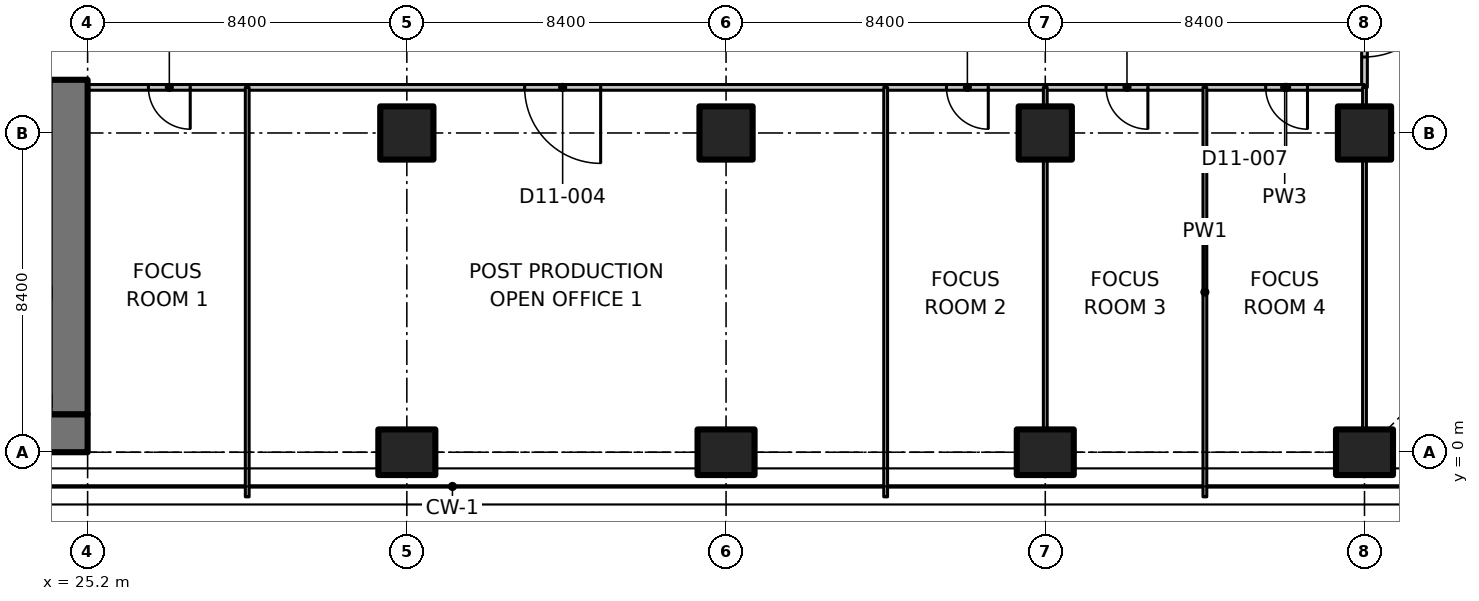
"""IFC4 building model, lengths in metres.
Left out: names, types, materials, properties, quantities, classifications, styles, units other than length and angle.
Written with IfcOpenShell. Run it as: python <this file> out.ifc"""

import sys

from ifc_helpers import new_model, si_unit, direction, frame, frame_2d, origin, origin_2d, place, context, subcontext, project, spatial, polyline, rectangle, outline, extrude, element, fill, save


model = new_model("IFC4")
c1 = context("Model", 3, precision=1e-05, world=origin(), true_north=direction((0.0, 1.0)))
c2 = subcontext(c1, "Body", "Model", "MODEL_VIEW")
j1 = project(units=[si_unit("LENGTHUNIT", "METRE"), si_unit("PLANEANGLEUNIT", "RADIAN")], contexts=[c1])
p1 = place(None, origin())
s1 = spatial("IfcSite", under=j1, at=p1, CompositionType="ELEMENT")
p2 = place(p1, origin())
s2 = spatial("IfcBuilding", under=s1, at=p2, CompositionType="ELEMENT")
p3 = place(p2, frame((0.0, 0.0, 83.3)))
s3 = spatial("IfcBuildingStorey", under=s2, at=p3, CompositionType="ELEMENT", Elevation=83.3)
p4 = place(p3, frame((33.6, 0.0, 0.0), z_axis=(0.0, 0.0, 1.0), x_axis=(0.0, 1.0, 0.0)))
e1 = element("IfcColumn", 1, at=p4, inside=s3, PredefinedType="COLUMN", context=c2, shape_type="SweptSolid", body=[
    extrude(rectangle(XDim=1.2, YDim=1.5, at=origin_2d()), origin(), (0.0, 0.0, 1.0), 3.3),
])
p5 = place(p3, frame((33.6, 8.4, 0.0), z_axis=(0.0, 0.0, 1.0), x_axis=(1.0, 0.0, 0.0)))
e2 = element("IfcColumn", 2, at=p5, inside=s3, PredefinedType="COLUMN", context=c2, shape_type="SweptSolid", body=[
    extrude(rectangle(XDim=1.4, YDim=1.4, at=origin_2d()), origin(), (0.0, 0.0, 1.0), 3.3),
])
p6 = place(p3, frame((42.0, 0.0, 0.0), z_axis=(0.0, 0.0, 1.0), x_axis=(0.0, 1.0, 0.0)))
e3 = element("IfcColumn", 3, at=p6, inside=s3, PredefinedType="COLUMN", context=c2, shape_type="SweptSolid", body=[
    extrude(rectangle(XDim=1.2, YDim=1.5, at=origin_2d()), origin(), (0.0, 0.0, 1.0), 3.3),
])
p7 = place(p3, frame((42.0, 8.4, 0.0), z_axis=(0.0, 0.0, 1.0), x_axis=(1.0, 0.0, 0.0)))
e4 = element("IfcColumn", 4, at=p7, inside=s3, PredefinedType="COLUMN", context=c2, shape_type="SweptSolid", body=[
    extrude(rectangle(XDim=1.4, YDim=1.4, at=origin_2d()), origin(), (0.0, 0.0, 1.0), 3.3),
])
p8 = place(p3, frame((50.4, 0.0, 0.0), z_axis=(0.0, 0.0, 1.0), x_axis=(0.0, 1.0, 0.0)))
e5 = element("IfcColumn", 5, at=p8, inside=s3, PredefinedType="COLUMN", context=c2, shape_type="SweptSolid", body=[
    extrude(rectangle(XDim=1.2, YDim=1.5, at=origin_2d()), origin(), (0.0, 0.0, 1.0), 3.3),
])
p9 = place(p3, frame((50.4, 8.4, 0.0), z_axis=(0.0, 0.0, 1.0), x_axis=(1.0, 0.0, 0.0)))
e6 = element("IfcColumn", 6, at=p9, inside=s3, PredefinedType="COLUMN", context=c2, shape_type="SweptSolid", body=[
    extrude(rectangle(XDim=1.4, YDim=1.4, at=origin_2d()), origin(), (0.0, 0.0, 1.0), 3.3),
])
p10 = place(p3, frame((58.8, 0.0, 0.0), z_axis=(0.0, 0.0, 1.0), x_axis=(0.0, 1.0, 0.0)))
e7 = element("IfcColumn", 7, at=p10, inside=s3, PredefinedType="COLUMN", context=c2, shape_type="SweptSolid", body=[
    extrude(rectangle(XDim=1.2, YDim=1.5, at=origin_2d()), origin(), (0.0, 0.0, 1.0), 3.3),
])
p11 = place(p3, frame((58.8, 8.4, 0.0), z_axis=(0.0, 0.0, 1.0), x_axis=(1.0, 0.0, 0.0)))
e8 = element("IfcColumn", 8, at=p11, inside=s3, PredefinedType="COLUMN", context=c2, shape_type="SweptSolid", body=[
    extrude(rectangle(XDim=1.4, YDim=1.4, at=origin_2d()), origin(), (0.0, 0.0, 1.0), 3.3),
])
p12 = place(p3, frame((6.936, 0.5, 0.0), z_axis=(0.0, 0.0, 1.0), x_axis=(1.0, 0.0, 0.0)))
e9 = element("IfcWall", 9, at=p12, inside=s3, PredefinedType="SHEAR", context=c2, shape_type="SweptSolid", body=[
    extrude(rectangle(XDim=18.264, YDim=1.0, at=frame_2d((9.132, 0.0))), origin(), (0.0, 0.0, 1.0), 3.3),
])
p13 = place(p3, frame((24.7, 1.0, 0.0), z_axis=(0.0, 0.0, 1.0), x_axis=(0.0, 1.0, 0.0)))
e10 = element("IfcWall", 10, at=p13, inside=s3, PredefinedType="SHEAR", context=c2, shape_type="SweptSolid", body=[
    extrude(rectangle(XDim=8.8, YDim=1.0, at=frame_2d((4.4, 0.0))), origin(), (0.0, 0.0, 1.0), 3.3),
])
p14 = place(p3, frame((29.4, 9.6, 0.0), z_axis=(0.0, 0.0, 1.0), x_axis=(-1.0, 0.0, 0.0)))
e11 = element("IfcWall", 11, at=p14, inside=s3, PredefinedType="PARTITIONING", context=c2, shape_type="SweptSolid", body=[
    extrude(rectangle(XDim=4.2, YDim=0.15, at=frame_2d((2.1, 0.0))), origin(), (0.0, 0.0, 1.0), 3.28),
])
p15 = place(p14, frame((1.5, 0.0, 0.0)))
e12 = element("IfcOpeningElement", 12, at=p15, cuts=e11, PredefinedType="OPENING", context=c2, shape_type="SweptSolid", body=[
    extrude(rectangle(XDim=1.1, YDim=2.1, at=frame_2d((0.55, 1.05))), frame((0.0, 0.085, 0.0), z_axis=(0.0, -1.0, 0.0), x_axis=(1.0, 0.0, 0.0)), (0.0, 0.0, 1.0), 0.17),
])
p16 = place(p3, frame((58.8, 13.0, 0.0), z_axis=(0.0, 0.0, 1.0), x_axis=(0.0, -1.0, 0.0)))
e13 = element("IfcWall", 13, at=p16, inside=s3, PredefinedType="PARTITIONING", context=c2, shape_type="SweptSolid", body=[
    extrude(rectangle(XDim=3.4, YDim=0.15, at=frame_2d((1.7, 0.0))), origin(), (0.0, 0.0, 1.0), 3.28),
])
p17 = place(p16, frame((0.6, 0.0, 0.0)))
e14 = element("IfcOpeningElement", 14, at=p17, cuts=e13, PredefinedType="OPENING", context=c2, shape_type="SweptSolid", body=[
    extrude(rectangle(XDim=2.0, YDim=2.4, at=frame_2d((1.0, 1.2))), frame((0.0, 0.085, 0.0), z_axis=(0.0, -1.0, 0.0), x_axis=(1.0, 0.0, 0.0)), (0.0, 0.0, 1.0), 0.17),
])
p18 = place(p3, frame((46.2, 9.6, 0.0), z_axis=(0.0, 0.0, 1.0), x_axis=(-1.0, 0.0, 0.0)))
e15 = element("IfcWall", 15, at=p18, inside=s3, PredefinedType="PARTITIONING", context=c2, shape_type="SweptSolid", body=[
    extrude(rectangle(XDim=16.8, YDim=0.15, at=frame_2d((8.4, 0.0))), origin(), (0.0, 0.0, 1.0), 3.28),
])
p19 = place(p18, frame((7.5, 0.0, 0.0)))
e16 = element("IfcOpeningElement", 16, at=p19, cuts=e15, PredefinedType="OPENING", context=c2, shape_type="SweptSolid", body=[
    extrude(rectangle(XDim=2.0, YDim=2.4, at=frame_2d((1.0, 1.2))), frame((0.0, 0.085, 0.0), z_axis=(0.0, -1.0, 0.0), x_axis=(1.0, 0.0, 0.0)), (0.0, 0.0, 1.0), 0.17),
])
p20 = place(p3, frame((50.4, 9.6, 0.0), z_axis=(0.0, 0.0, 1.0), x_axis=(-1.0, 0.0, 0.0)))
e17 = element("IfcWall", 17, at=p20, inside=s3, PredefinedType="PARTITIONING", context=c2, shape_type="SweptSolid", body=[
    extrude(rectangle(XDim=4.2, YDim=0.15, at=frame_2d((2.1, 0.0))), origin(), (0.0, 0.0, 1.0), 3.28),
])
p21 = place(p20, frame((1.5, 0.0, 0.0)))
e18 = element("IfcOpeningElement", 18, at=p21, cuts=e17, PredefinedType="OPENING", context=c2, shape_type="SweptSolid", body=[
    extrude(rectangle(XDim=1.1, YDim=2.1, at=frame_2d((0.55, 1.05))), frame((0.0, 0.085, 0.0), z_axis=(0.0, -1.0, 0.0), x_axis=(1.0, 0.0, 0.0)), (0.0, 0.0, 1.0), 0.17),
])
p22 = place(p3, frame((54.6, 9.6, 0.0), z_axis=(0.0, 0.0, 1.0), x_axis=(-1.0, 0.0, 0.0)))
e19 = element("IfcWall", 19, at=p22, inside=s3, PredefinedType="PARTITIONING", context=c2, shape_type="SweptSolid", body=[
    extrude(rectangle(XDim=4.2, YDim=0.15, at=frame_2d((2.1, 0.0))), origin(), (0.0, 0.0, 1.0), 3.28),
])
p23 = place(p22, frame((1.5, 0.0, 0.0)))
e20 = element("IfcOpeningElement", 20, at=p23, cuts=e19, PredefinedType="OPENING", context=c2, shape_type="SweptSolid", body=[
    extrude(rectangle(XDim=1.1, YDim=2.1, at=frame_2d((0.55, 1.05))), frame((0.0, 0.085, 0.0), z_axis=(0.0, -1.0, 0.0), x_axis=(1.0, 0.0, 0.0)), (0.0, 0.0, 1.0), 0.17),
])
p24 = place(p3, frame((58.8, 9.6, 0.0), z_axis=(0.0, 0.0, 1.0), x_axis=(-1.0, 0.0, 0.0)))
e21 = element("IfcWall", 21, at=p24, inside=s3, PredefinedType="PARTITIONING", context=c2, shape_type="SweptSolid", body=[
    extrude(rectangle(XDim=4.2, YDim=0.15, at=frame_2d((2.1, 0.0))), origin(), (0.0, 0.0, 1.0), 3.28),
])
p25 = place(p24, frame((1.5, 0.0, 0.0)))
e22 = element("IfcOpeningElement", 22, at=p25, cuts=e21, PredefinedType="OPENING", context=c2, shape_type="SweptSolid", body=[
    extrude(rectangle(XDim=1.1, YDim=2.1, at=frame_2d((0.55, 1.05))), frame((0.0, 0.085, 0.0), z_axis=(0.0, -1.0, 0.0), x_axis=(1.0, 0.0, 0.0)), (0.0, 0.0, 1.0), 0.17),
])
p26 = place(p3, frame((58.8, 0.62, 0.0), z_axis=(0.0, 0.0, 1.0), x_axis=(0.0, 1.0, 0.0)))
e23 = element("IfcWall", 23, at=p26, inside=s3, PredefinedType="PARTITIONING", context=c2, shape_type="SweptSolid", body=[
    extrude(rectangle(XDim=7.06, YDim=0.1, at=frame_2d((3.53, 0.0))), origin(), (0.0, 0.0, 1.0), 3.28),
])
p27 = place(p3, frame((58.8, 9.12, 0.0), z_axis=(0.0, 0.0, 1.0), x_axis=(0.0, 1.0, 0.0)))
e24 = element("IfcWall", 24, at=p27, inside=s3, PredefinedType="PARTITIONING", context=c2, shape_type="SweptSolid", body=[
    extrude(rectangle(XDim=0.48, YDim=0.1, at=frame_2d((0.24, 0.0))), origin(), (0.0, 0.0, 1.0), 3.28),
])
for number, where, z_axis, x_axis in (
    (25, (29.4, 9.6, 0.0), (0.0, 0.0, 1.0), (0.0, -1.0, 0.0)),
    (26, (46.2, 9.6, 0.0), (0.0, 0.0, 1.0), (0.0, -1.0, 0.0)),
):
    element("IfcWall", number, at=place(p3, frame(where, z_axis=z_axis, x_axis=x_axis)), inside=s3, PredefinedType="PARTITIONING", context=c2, shape_type="SweptSolid", body=[
        extrude(outline(polyline([(0.0, 0.0), (10.774, 0.0), (10.774, 3.28), (10.7, 3.28), (10.05, 3.28), (10.048, 2.93), (9.152, 2.93), (9.15, 3.28), (0.0, 3.28), (0.0, 0.0)])), frame((0.0, 0.05, 0.0), z_axis=(0.0, -1.0, 0.0), x_axis=(1.0, 0.0, 0.0)), (0.0, 0.0, 1.0), 0.1),
    ])
p28 = place(p3, frame((50.4, 9.6, 0.0), z_axis=(0.0, 0.0, 1.0), x_axis=(0.0, -1.0, 0.0)))
e27 = element("IfcWall", 27, at=p28, inside=s3, PredefinedType="PARTITIONING", context=c2, shape_type="SweptSolid", body=[
    extrude(rectangle(XDim=0.48, YDim=0.1, at=frame_2d((0.24, 0.0))), origin(), (0.0, 0.0, 1.0), 3.28),
])
p29 = place(p3, frame((50.4, 7.68, 0.0), z_axis=(0.0, 0.0, 1.0), x_axis=(0.0, -1.0, 0.0)))
e28 = element("IfcWall", 28, at=p29, inside=s3, PredefinedType="PARTITIONING", context=c2, shape_type="SweptSolid", body=[
    extrude(rectangle(XDim=7.06, YDim=0.1, at=frame_2d((3.53, 0.0))), origin(), (0.0, 0.0, 1.0), 3.28),
])
p30 = place(p3, frame((54.6, 9.6, 0.0), z_axis=(0.0, 0.0, 1.0), x_axis=(0.0, -1.0, 0.0)))
e29 = element("IfcWall", 29, at=p30, inside=s3, PredefinedType="PARTITIONING", context=c2, shape_type="SweptSolid", body=[
    extrude(outline(polyline([(0.0, 0.0), (10.774, 0.0), (10.774, 3.28), (10.7, 3.28), (10.05, 3.28), (10.048, 2.93), (9.152, 2.93), (9.15, 3.28), (0.0, 3.28), (0.0, 0.0)])), frame((0.0, 0.05, 0.0), z_axis=(0.0, -1.0, 0.0), x_axis=(1.0, 0.0, 0.0)), (0.0, 0.0, 1.0), 0.1),
])
p31 = place(p17, origin())
e30 = element("IfcDoor", 30, at=p31, inside=s3, OperationType="DOUBLE_DOOR_SINGLE_SWING", PredefinedType="DOOR", context=c2, shape_type="SweptSolid", body=[
    extrude(rectangle(XDim=2.0, YDim=2.4, at=frame_2d((1.0, 1.2))), frame((0.0, 0.025, 0.0), z_axis=(0.0, -1.0, 0.0), x_axis=(1.0, 0.0, 0.0)), (0.0, 0.0, 1.0), 0.05),
])
fill(e14, e30)
p32 = place(p15, origin())
e31 = element("IfcDoor", 31, at=p32, inside=s3, OperationType="SINGLE_SWING_LEFT", PredefinedType="DOOR", context=c2, shape_type="SweptSolid", body=[
    extrude(rectangle(XDim=1.1, YDim=2.1, at=frame_2d((0.55, 1.05))), frame((0.0, 0.025, 0.0), z_axis=(0.0, -1.0, 0.0), x_axis=(1.0, 0.0, 0.0)), (0.0, 0.0, 1.0), 0.05),
])
fill(e12, e31)
p33 = place(p19, origin())
e32 = element("IfcDoor", 32, at=p33, inside=s3, OperationType="DOUBLE_DOOR_SINGLE_SWING", PredefinedType="DOOR", context=c2, shape_type="SweptSolid", body=[
    extrude(rectangle(XDim=2.0, YDim=2.4, at=frame_2d((1.0, 1.2))), frame((0.0, 0.025, 0.0), z_axis=(0.0, -1.0, 0.0), x_axis=(1.0, 0.0, 0.0)), (0.0, 0.0, 1.0), 0.05),
])
fill(e16, e32)
p34 = place(p21, origin())
e33 = element("IfcDoor", 33, at=p34, inside=s3, OperationType="SINGLE_SWING_LEFT", PredefinedType="DOOR", context=c2, shape_type="SweptSolid", body=[
    extrude(rectangle(XDim=1.1, YDim=2.1, at=frame_2d((0.55, 1.05))), frame((0.0, 0.025, 0.0), z_axis=(0.0, -1.0, 0.0), x_axis=(1.0, 0.0, 0.0)), (0.0, 0.0, 1.0), 0.05),
])
fill(e18, e33)
p35 = place(p23, origin())
e34 = element("IfcDoor", 34, at=p35, inside=s3, OperationType="SINGLE_SWING_LEFT", PredefinedType="DOOR", context=c2, shape_type="SweptSolid", body=[
    extrude(rectangle(XDim=1.1, YDim=2.1, at=frame_2d((0.55, 1.05))), frame((0.0, 0.025, 0.0), z_axis=(0.0, -1.0, 0.0), x_axis=(1.0, 0.0, 0.0)), (0.0, 0.0, 1.0), 0.05),
])
fill(e20, e34)
p36 = place(p25, origin())
e35 = element("IfcDoor", 35, at=p36, inside=s3, OperationType="SINGLE_SWING_LEFT", PredefinedType="DOOR", context=c2, shape_type="SweptSolid", body=[
    extrude(rectangle(XDim=1.1, YDim=2.1, at=frame_2d((0.55, 1.05))), frame((0.0, 0.025, 0.0), z_axis=(0.0, -1.0, 0.0), x_axis=(1.0, 0.0, 0.0)), (0.0, 0.0, 1.0), 0.05),
])
fill(e22, e35)
save(model, sys.argv[1])
